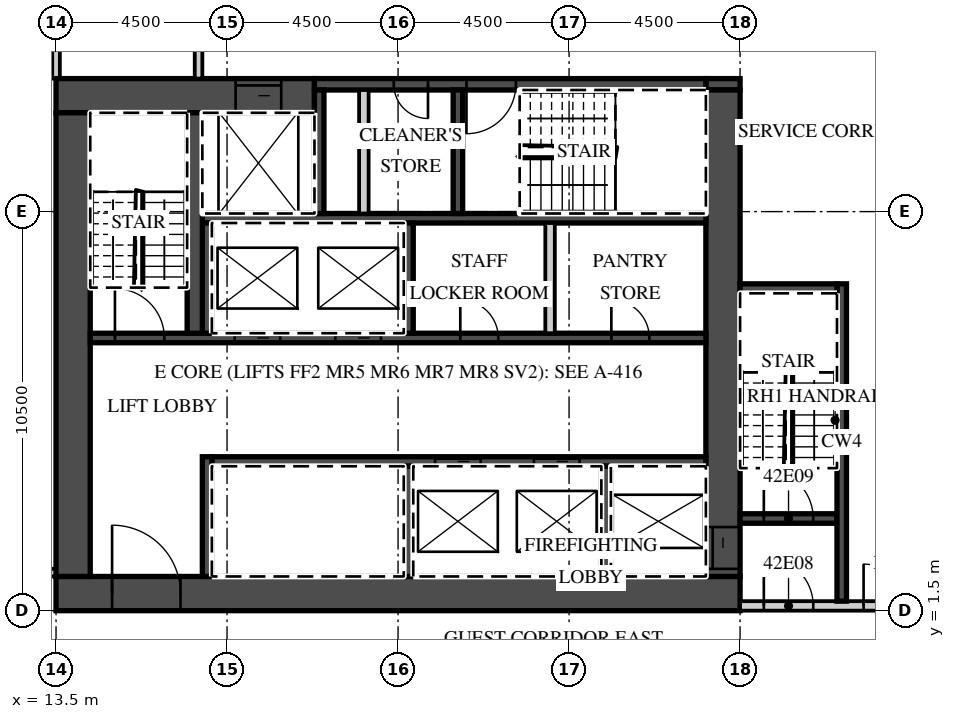
"""IFC4 building model, lengths in metres.
Left out: names, types, materials, properties, quantities, classifications, styles, units other than length and angle.
Written with IfcOpenShell. Run it as: python <this file> out.ifc"""

import sys

from ifc_helpers import new_model, si_unit, direction, frame, frame_2d, origin, place, context, subcontext, project, spatial, rectangle, extrude, element, fill, save


model = new_model("IFC4")
c1 = context("Model", 3, precision=1e-05, world=origin(), true_north=direction((0.0, 1.0)))
c2 = subcontext(c1, "Body", "Model", "MODEL_VIEW")
j1 = project(units=[si_unit("LENGTHUNIT", "METRE"), si_unit("PLANEANGLEUNIT", "RADIAN")], contexts=[c1])
p1 = place(None, origin())
s1 = spatial("IfcSite", under=j1, at=p1, CompositionType="ELEMENT")
p2 = place(p1, origin())
s2 = spatial("IfcBuilding", under=s1, at=p2, CompositionType="ELEMENT")
p3 = place(p2, frame((0.0, 0.0, 180.1)))
s3 = spatial("IfcBuildingStorey", under=s2, at=p3, CompositionType="ELEMENT", Elevation=180.1)
p4 = place(p3, frame((13.5, 15.5, 0.0), z_axis=(0.0, 0.0, 1.0), x_axis=(0.0, 1.0, 0.0)))
e1 = element("IfcWall", 1, at=p4, inside=s3, PredefinedType="PARTITIONING", context=c2, shape_type="SweptSolid", body=[
    extrude(rectangle(XDim=6.089, YDim=0.2, at=frame_2d((3.044, 0.0))), origin(), (0.0, 0.0, 1.0), 3.02),
])
p5 = place(p3, frame((-13.5, 2.5, 0.0), z_axis=(0.0, 0.0, 1.0), x_axis=(1.0, 0.0, 0.0)))
e2 = element("IfcWall", 2, at=p5, inside=s3, PredefinedType="PARTITIONING", context=c2, shape_type="SweptSolid", body=[
    extrude(rectangle(XDim=27.0, YDim=0.2, at=frame_2d((13.5, 0.0))), origin(), (0.0, 0.0, 1.0), 3.02),
])
p6 = place(p5, frame((0.575, 0.0, 0.0)))
e3 = element("IfcOpeningElement", 3, at=p6, cuts=e2, PredefinedType="OPENING", context=c2, shape_type="SweptSolid", body=[
    extrude(rectangle(XDim=1.0, YDim=2.1, at=frame_2d((0.5, 1.05))), frame((0.0, 0.11, 0.0), z_axis=(0.0, -1.0, 0.0), x_axis=(1.0, 0.0, 0.0)), (0.0, 0.0, 1.0), 0.22),
])
p7 = place(p5, frame((9.863, 0.0, 0.0)))
e4 = element("IfcOpeningElement", 4, at=p7, cuts=e2, PredefinedType="OPENING", context=c2, shape_type="SweptSolid", body=[
    extrude(rectangle(XDim=1.2, YDim=2.1, at=frame_2d((0.6, 1.05))), frame((0.0, 0.11, 0.0), z_axis=(0.0, -1.0, 0.0), x_axis=(1.0, 0.0, 0.0)), (0.0, 0.0, 1.0), 0.22),
])
p8 = place(p5, frame((15.938, 0.0, 0.0)))
e5 = element("IfcOpeningElement", 5, at=p8, cuts=e2, PredefinedType="OPENING", context=c2, shape_type="SweptSolid", body=[
    extrude(rectangle(XDim=1.2, YDim=2.1, at=frame_2d((0.6, 1.05))), frame((0.0, 0.11, 0.0), z_axis=(0.0, -1.0, 0.0), x_axis=(1.0, 0.0, 0.0)), (0.0, 0.0, 1.0), 0.22),
])
p9 = place(p5, frame((25.425, 0.0, 0.0)))
e6 = element("IfcOpeningElement", 6, at=p9, cuts=e2, PredefinedType="OPENING", context=c2, shape_type="SweptSolid", body=[
    extrude(rectangle(XDim=1.0, YDim=2.1, at=frame_2d((0.5, 1.05))), frame((0.0, 0.11, 0.0), z_axis=(0.0, -1.0, 0.0), x_axis=(1.0, 0.0, 0.0)), (0.0, 0.0, 1.0), 0.22),
])
p10 = place(p3, frame((13.5, 1.95, 0.0), z_axis=(0.0, 0.0, 1.0), x_axis=(1.0, 0.0, 0.0)))
e7 = element("IfcWall", 7, at=p10, inside=s3, PredefinedType="SHEAR", context=c2, shape_type="SweptSolid", body=[
    extrude(rectangle(XDim=18.0, YDim=0.9, at=frame_2d((9.0, 0.0))), origin(), (0.0, 0.0, 1.0), 3.02),
])
p11 = place(p10, frame((1.475, 0.0, 0.0)))
e8 = element("IfcOpeningElement", 8, at=p11, cuts=e7, PredefinedType="OPENING", context=c2, shape_type="SweptSolid", body=[
    extrude(rectangle(XDim=1.8, YDim=2.1, at=frame_2d((0.9, 1.05))), frame((0.0, 0.46, 0.0), z_axis=(0.0, -1.0, 0.0), x_axis=(1.0, 0.0, 0.0)), (0.0, 0.0, 1.0), 0.92),
])
p12 = place(p3, frame((13.5, 15.05, 0.0), z_axis=(0.0, 0.0, 1.0), x_axis=(1.0, 0.0, 0.0)))
e9 = element("IfcWall", 9, at=p12, inside=s3, PredefinedType="SHEAR", context=c2, shape_type="SweptSolid", body=[
    extrude(rectangle(XDim=6.8, YDim=0.9, at=frame_2d((3.4, 0.0))), origin(), (0.0, 0.0, 1.0), 3.02),
])
p13 = place(p12, frame((4.725, 0.0, 0.0)))
e10 = element("IfcOpeningElement", 10, at=p13, cuts=e9, PredefinedType="OPENING", context=c2, shape_type="SweptSolid", body=[
    extrude(rectangle(XDim=1.2, YDim=2.1, at=frame_2d((0.6, 1.05))), frame((0.0, 0.46, 0.0), z_axis=(0.0, -1.0, 0.0), x_axis=(1.0, 0.0, 0.0)), (0.0, 0.0, 1.0), 0.92),
])
p14 = place(p3, frame((30.6, 15.35, 0.0), z_axis=(0.0, 0.0, 1.0), x_axis=(1.0, 0.0, 0.0)))
e11 = element("IfcWall", 11, at=p14, inside=s3, PredefinedType="SHEAR", context=c2, shape_type="SweptSolid", body=[
    extrude(rectangle(XDim=0.9, YDim=0.3, at=frame_2d((0.45, 0.0))), origin(), (0.0, 0.0, 1.0), 3.02),
])
p15 = place(p3, frame((20.3, 15.35, 0.0), z_axis=(0.0, 0.0, 1.0), x_axis=(1.0, 0.0, 0.0)))
e12 = element("IfcWall", 12, at=p15, inside=s3, PredefinedType="SHEAR", context=c2, shape_type="SweptSolid", body=[
    extrude(rectangle(XDim=10.3, YDim=0.3, at=frame_2d((5.15, 0.0))), origin(), (0.0, 0.0, 1.0), 3.02),
])
p16 = place(p15, frame((4.0, 0.0, 0.0)))
e13 = element("IfcOpeningElement", 13, at=p16, cuts=e12, PredefinedType="OPENING", context=c2, shape_type="SweptSolid", body=[
    extrude(rectangle(XDim=1.3, YDim=2.1, at=frame_2d((0.65, 1.05))), frame((0.0, 0.16, 0.0), z_axis=(0.0, -1.0, 0.0), x_axis=(1.0, 0.0, 0.0)), (0.0, 0.0, 1.0), 0.32),
])
p17 = place(p15, frame((2.087, 0.0, 0.0)))
e14 = element("IfcOpeningElement", 14, at=p17, cuts=e12, PredefinedType="OPENING", context=c2, shape_type="SweptSolid", body=[
    extrude(rectangle(XDim=0.9, YDim=2.1, at=frame_2d((0.45, 1.05))), frame((0.0, 0.16, 0.0), z_axis=(0.0, -1.0, 0.0), x_axis=(1.0, 0.0, 0.0)), (0.0, 0.0, 1.0), 0.32),
])
p18 = place(p3, frame((31.05, 2.4, 0.0), z_axis=(0.0, 0.0, 1.0), x_axis=(0.0, 1.0, 0.0)))
e15 = element("IfcWall", 15, at=p18, inside=s3, PredefinedType="SHEAR", context=c2, shape_type="SweptSolid", body=[
    extrude(rectangle(XDim=12.8, YDim=0.9, at=frame_2d((6.4, 0.0))), origin(), (0.0, 0.0, 1.0), 3.02),
])
p19 = place(p18, frame((0.2, 0.0, 0.0)))
e16 = element("IfcOpeningElement", 16, at=p19, cuts=e15, PredefinedType="OPENING", context=c2, shape_type="SweptSolid", body=[
    extrude(rectangle(XDim=1.1, YDim=2.1, at=frame_2d((0.55, 1.05))), frame((0.0, 0.46, 0.0), z_axis=(0.0, -1.0, 0.0), x_axis=(1.0, 0.0, 0.0)), (0.0, 0.0, 1.0), 0.92),
])
p20 = place(p3, frame((13.95, 2.4, 0.0), z_axis=(0.0, 0.0, 1.0), x_axis=(0.0, 1.0, 0.0)))
e17 = element("IfcWall", 17, at=p20, inside=s3, PredefinedType="SHEAR", context=c2, shape_type="SweptSolid", body=[
    extrude(rectangle(XDim=12.2, YDim=0.9, at=frame_2d((6.1, 0.0))), origin(), (0.0, 0.0, 1.0), 3.02),
])
p21 = place(p3, frame((17.6, 5.425, 0.0), z_axis=(0.0, 0.0, 1.0), x_axis=(1.0, 0.0, 0.0)))
e18 = element("IfcWall", 18, at=p21, inside=s3, PredefinedType="SHEAR", context=c2, shape_type="SweptSolid", body=[
    extrude(rectangle(XDim=13.0, YDim=0.25, at=frame_2d((6.5, 0.0))), origin(), (0.0, 0.0, 1.0), 3.02),
])
p22 = place(p21, frame((8.475, 0.0, 0.0)))
e19 = element("IfcOpeningElement", 19, at=p22, cuts=e18, PredefinedType="OPENING", context=c2, shape_type="SweptSolid", body=[
    extrude(rectangle(XDim=1.2, YDim=2.1, at=frame_2d((0.6, 1.05))), frame((0.0, 0.135, 0.0), z_axis=(0.0, -1.0, 0.0), x_axis=(1.0, 0.0, 0.0)), (0.0, 0.0, 1.0), 0.27),
])
p23 = place(p21, frame((5.875, 0.0, 0.0)))
e20 = element("IfcOpeningElement", 20, at=p23, cuts=e18, PredefinedType="OPENING", context=c2, shape_type="SweptSolid", body=[
    extrude(rectangle(XDim=1.2, YDim=2.1, at=frame_2d((0.6, 1.05))), frame((0.0, 0.135, 0.0), z_axis=(0.0, -1.0, 0.0), x_axis=(1.0, 0.0, 0.0)), (0.0, 0.0, 1.0), 0.27),
])
p24 = place(p3, frame((17.475, 2.4, 0.0), z_axis=(0.0, 0.0, 1.0), x_axis=(0.0, 1.0, 0.0)))
e21 = element("IfcWall", 21, at=p24, inside=s3, PredefinedType="SHEAR", context=c2, shape_type="SweptSolid", body=[
    extrude(rectangle(XDim=3.15, YDim=0.25, at=frame_2d((1.575, 0.0))), origin(), (0.0, 0.0, 1.0), 3.02),
])
for number, where, z_axis, x_axis in (
    (22, (27.975, 2.4, 0.0), (0.0, 0.0, 1.0), (0.0, 1.0, 0.0)),
    (23, (22.775, 2.4, 0.0), (0.0, 0.0, 1.0), (0.0, 1.0, 0.0)),
):
    element("IfcWall", number, at=place(p3, frame(where, z_axis=z_axis, x_axis=x_axis)), inside=s3, PredefinedType="SHEAR", context=c2, shape_type="SweptSolid", body=[
        extrude(rectangle(XDim=2.9, YDim=0.25, at=frame_2d((1.45, 0.0))), origin(), (0.0, 0.0, 1.0), 3.02),
    ])
p25 = place(p3, frame((14.4, 8.675, 0.0), z_axis=(0.0, 0.0, 1.0), x_axis=(1.0, 0.0, 0.0)))
e24 = element("IfcWall", 24, at=p25, inside=s3, PredefinedType="SHEAR", context=c2, shape_type="SweptSolid", body=[
    extrude(rectangle(XDim=16.2, YDim=0.25, at=frame_2d((8.1, 0.0))), origin(), (0.0, 0.0, 1.0), 3.02),
])
p26 = place(p25, frame((6.45, 0.0, 0.0)))
e25 = element("IfcOpeningElement", 25, at=p26, cuts=e24, PredefinedType="OPENING", context=c2, shape_type="SweptSolid", body=[
    extrude(rectangle(XDim=1.2, YDim=2.1, at=frame_2d((0.6, 1.05))), frame((0.0, 0.135, 0.0), z_axis=(0.0, -1.0, 0.0), x_axis=(1.0, 0.0, 0.0)), (0.0, 0.0, 1.0), 0.27),
])
p27 = place(p25, frame((3.8, 0.0, 0.0)))
e26 = element("IfcOpeningElement", 26, at=p27, cuts=e24, PredefinedType="OPENING", context=c2, shape_type="SweptSolid", body=[
    extrude(rectangle(XDim=1.2, YDim=2.1, at=frame_2d((0.6, 1.05))), frame((0.0, 0.135, 0.0), z_axis=(0.0, -1.0, 0.0), x_axis=(1.0, 0.0, 0.0)), (0.0, 0.0, 1.0), 0.27),
])
p28 = place(p25, frame((0.65, 0.0, 0.0)))
e27 = element("IfcOpeningElement", 27, at=p28, cuts=e24, PredefinedType="OPENING", context=c2, shape_type="SweptSolid", body=[
    extrude(rectangle(XDim=1.3, YDim=2.1, at=frame_2d((0.65, 1.05))), frame((0.0, 0.135, 0.0), z_axis=(0.0, -1.0, 0.0), x_axis=(1.0, 0.0, 0.0)), (0.0, 0.0, 1.0), 0.27),
])
p29 = place(p25, frame((13.712, 0.0, 0.0)))
e28 = element("IfcOpeningElement", 28, at=p29, cuts=e24, PredefinedType="OPENING", context=c2, shape_type="SweptSolid", body=[
    extrude(rectangle(XDim=1.0, YDim=2.1, at=frame_2d((0.5, 1.05))), frame((0.0, 0.135, 0.0), z_axis=(0.0, -1.0, 0.0), x_axis=(1.0, 0.0, 0.0)), (0.0, 0.0, 1.0), 0.27),
])
p30 = place(p25, frame((9.738, 0.0, 0.0)))
e29 = element("IfcOpeningElement", 29, at=p30, cuts=e24, PredefinedType="OPENING", context=c2, shape_type="SweptSolid", body=[
    extrude(rectangle(XDim=1.0, YDim=2.1, at=frame_2d((0.5, 1.05))), frame((0.0, 0.135, 0.0), z_axis=(0.0, -1.0, 0.0), x_axis=(1.0, 0.0, 0.0)), (0.0, 0.0, 1.0), 0.27),
])
p31 = place(p3, frame((17.35, 11.825, 0.0), z_axis=(0.0, 0.0, 1.0), x_axis=(1.0, 0.0, 0.0)))
e30 = element("IfcWall", 30, at=p31, inside=s3, PredefinedType="SHEAR", context=c2, shape_type="SweptSolid", body=[
    extrude(rectangle(XDim=13.25, YDim=0.25, at=frame_2d((6.625, 0.0))), origin(), (0.0, 0.0, 1.0), 3.02),
])
for number, where, z_axis, x_axis in (
    (31, (17.475, 8.8, 0.0), (0.0, 0.0, 1.0), (0.0, 1.0, 0.0)),
    (32, (22.775, 8.8, 0.0), (0.0, 0.0, 1.0), (0.0, 1.0, 0.0)),
):
    element("IfcWall", number, at=place(p3, frame(where, z_axis=z_axis, x_axis=x_axis)), inside=s3, PredefinedType="SHEAR", context=c2, shape_type="SweptSolid", body=[
        extrude(rectangle(XDim=2.9, YDim=0.25, at=frame_2d((1.45, 0.0))), origin(), (0.0, 0.0, 1.0), 3.02),
    ])
p32 = place(p3, frame((26.5, 8.8, 0.0), z_axis=(0.0, 0.0, 1.0), x_axis=(0.0, 1.0, 0.0)))
e33 = element("IfcWall", 33, at=p32, inside=s3, PredefinedType="PARTITIONING", context=c2, shape_type="SweptSolid", body=[
    extrude(rectangle(XDim=2.9, YDim=0.25, at=frame_2d((1.45, 0.0))), origin(), (0.0, 0.0, 1.0), 3.02),
])
p33 = place(p3, frame((17.15, 8.8, 0.0), z_axis=(0.0, 0.0, 1.0), x_axis=(0.0, 1.0, 0.0)))
e34 = element("IfcWall", 34, at=p33, inside=s3, PredefinedType="SHEAR", context=c2, shape_type="SweptSolid", body=[
    extrude(rectangle(XDim=5.8, YDim=0.4, at=frame_2d((2.9, 0.0))), origin(), (0.0, 0.0, 1.0), 3.02),
])
for number, where, z_axis, x_axis in (
    (35, (20.425, 11.95, 0.0), (0.0, 0.0, 1.0), (0.0, 1.0, 0.0)),
    (36, (24.075, 11.95, 0.0), (0.0, 0.0, 1.0), (0.0, 1.0, 0.0)),
):
    element("IfcWall", number, at=place(p3, frame(where, z_axis=z_axis, x_axis=x_axis)), inside=s3, PredefinedType="SHEAR", context=c2, shape_type="SweptSolid", body=[
        extrude(rectangle(XDim=3.25, YDim=0.25, at=frame_2d((1.625, 0.0))), origin(), (0.0, 0.0, 1.0), 3.02),
    ])
p34 = place(p3, frame((21.6, 11.95, 0.0), z_axis=(0.0, 0.0, 1.0), x_axis=(0.0, 1.0, 0.0)))
e37 = element("IfcWall", 37, at=p34, inside=s3, PredefinedType="PARTITIONING", context=c2, shape_type="SweptSolid", body=[
    extrude(rectangle(XDim=3.25, YDim=0.25, at=frame_2d((1.625, 0.0))), origin(), (0.0, 0.0, 1.0), 3.02),
])
p35 = place(p3, frame((31.5, 1.625, 0.0), z_axis=(0.0, 0.0, 1.0), x_axis=(1.0, 0.0, 0.0)))
e38 = element("IfcWall", 38, at=p35, inside=s3, PredefinedType="PARTITIONING", context=c2, shape_type="SweptSolid", body=[
    extrude(rectangle(XDim=8.035, YDim=0.25, at=frame_2d((4.018, 0.0))), origin(), (0.0, 0.0, 1.0), 3.02),
])
p36 = place(p35, frame((0.625, 0.0, 0.0)))
e39 = element("IfcOpeningElement", 39, at=p36, cuts=e38, PredefinedType="OPENING", context=c2, shape_type="SweptSolid", body=[
    extrude(rectangle(XDim=1.3, YDim=2.1, at=frame_2d((0.65, 1.05))), frame((0.0, 0.135, 0.0), z_axis=(0.0, -1.0, 0.0), x_axis=(1.0, 0.0, 0.0)), (0.0, 0.0, 1.0), 0.27),
])
p37 = place(p35, frame((3.25, 0.0, 0.0)))
e40 = element("IfcOpeningElement", 40, at=p37, cuts=e38, PredefinedType="OPENING", context=c2, shape_type="SweptSolid", body=[
    extrude(rectangle(XDim=1.1, YDim=2.1, at=frame_2d((0.55, 1.05))), frame((0.0, 0.135, 0.0), z_axis=(0.0, -1.0, 0.0), x_axis=(1.0, 0.0, 0.0)), (0.0, 0.0, 1.0), 0.27),
])
p38 = place(p3, frame((31.5, 3.925, 0.0), z_axis=(0.0, 0.0, 1.0), x_axis=(1.0, 0.0, 0.0)))
e41 = element("IfcWall", 41, at=p38, inside=s3, PredefinedType="SHEAR", context=c2, shape_type="SweptSolid", body=[
    extrude(rectangle(XDim=2.55, YDim=0.25, at=frame_2d((1.275, 0.0))), origin(), (0.0, 0.0, 1.0), 3.02),
])
p39 = place(p38, frame((0.625, 0.0, 0.0)))
e42 = element("IfcOpeningElement", 42, at=p39, cuts=e41, PredefinedType="OPENING", context=c2, shape_type="SweptSolid", body=[
    extrude(rectangle(XDim=1.3, YDim=2.1, at=frame_2d((0.65, 1.05))), frame((0.0, 0.135, 0.0), z_axis=(0.0, -1.0, 0.0), x_axis=(1.0, 0.0, 0.0)), (0.0, 0.0, 1.0), 0.27),
])
p40 = place(p3, frame((34.175, 1.75, 0.0), z_axis=(0.0, 0.0, 1.0), x_axis=(0.0, 1.0, 0.0)))
e43 = element("IfcWall", 43, at=p40, inside=s3, PredefinedType="SHEAR", context=c2, shape_type="SweptSolid", body=[
    extrude(rectangle(XDim=8.35, YDim=0.25, at=frame_2d((4.175, 0.0))), origin(), (0.0, 0.0, 1.0), 3.02),
])
p41 = place(p3, frame((31.5, 9.975, 0.0), z_axis=(0.0, 0.0, 1.0), x_axis=(1.0, 0.0, 0.0)))
e44 = element("IfcWall", 44, at=p41, inside=s3, PredefinedType="SHEAR", context=c2, shape_type="SweptSolid", body=[
    extrude(rectangle(XDim=2.55, YDim=0.25, at=frame_2d((1.275, 0.0))), origin(), (0.0, 0.0, 1.0), 3.02),
])
p42 = place(p3, frame((17.25, 15.5, 0.0), z_axis=(0.0, 0.0, 1.0), x_axis=(0.0, 1.0, 0.0)))
e45 = element("IfcWall", 45, at=p42, inside=s3, PredefinedType="PARTITIONING", context=c2, shape_type="SweptSolid", body=[
    extrude(rectangle(XDim=2.2, YDim=0.2, at=frame_2d((1.1, 0.0))), origin(), (0.0, 0.0, 1.0), 3.02),
])
p43 = place(p26, origin())
e46 = element("IfcDoor", 46, at=p43, inside=s3, OperationType="SLIDING_TO_LEFT", PredefinedType="DOOR", context=c2, shape_type="SweptSolid", body=[
    extrude(rectangle(XDim=1.2, YDim=2.1, at=frame_2d((0.6, 1.05))), frame((0.0, 0.025, 0.0), z_axis=(0.0, -1.0, 0.0), x_axis=(1.0, 0.0, 0.0)), (0.0, 0.0, 1.0), 0.05),
])
fill(e25, e46)
p44 = place(p27, origin())
e47 = element("IfcDoor", 47, at=p44, inside=s3, OperationType="SLIDING_TO_RIGHT", PredefinedType="DOOR", context=c2, shape_type="SweptSolid", body=[
    extrude(rectangle(XDim=1.2, YDim=2.1, at=frame_2d((0.6, 1.05))), frame((0.0, 0.025, 0.0), z_axis=(0.0, -1.0, 0.0), x_axis=(1.0, 0.0, 0.0)), (0.0, 0.0, 1.0), 0.05),
])
fill(e26, e47)
p45 = place(p22, origin())
e48 = element("IfcDoor", 48, at=p45, inside=s3, OperationType="SLIDING_TO_LEFT", PredefinedType="DOOR", context=c2, shape_type="SweptSolid", body=[
    extrude(rectangle(XDim=1.2, YDim=2.1, at=frame_2d((0.6, 1.05))), frame((0.0, 0.025, 0.0), z_axis=(0.0, -1.0, 0.0), x_axis=(1.0, 0.0, 0.0)), (0.0, 0.0, 1.0), 0.05),
])
fill(e19, e48)
p46 = place(p23, origin())
e49 = element("IfcDoor", 49, at=p46, inside=s3, OperationType="SLIDING_TO_RIGHT", PredefinedType="DOOR", context=c2, shape_type="SweptSolid", body=[
    extrude(rectangle(XDim=1.2, YDim=2.1, at=frame_2d((0.6, 1.05))), frame((0.0, 0.025, 0.0), z_axis=(0.0, -1.0, 0.0), x_axis=(1.0, 0.0, 0.0)), (0.0, 0.0, 1.0), 0.05),
])
fill(e20, e49)
p47 = place(p13, origin())
e50 = element("IfcDoor", 50, at=p47, inside=s3, OperationType="SLIDING_TO_LEFT", PredefinedType="DOOR", context=c2, shape_type="SweptSolid", body=[
    extrude(rectangle(XDim=1.2, YDim=2.1, at=frame_2d((0.6, 1.05))), frame((0.0, 0.025, 0.0), z_axis=(0.0, -1.0, 0.0), x_axis=(1.0, 0.0, 0.0)), (0.0, 0.0, 1.0), 0.05),
])
fill(e10, e50)
p48 = place(p19, origin())
e51 = element("IfcDoor", 51, at=p48, inside=s3, OperationType="SLIDING_TO_LEFT", PredefinedType="DOOR", context=c2, shape_type="SweptSolid", body=[
    extrude(rectangle(XDim=1.1, YDim=2.1, at=frame_2d((0.55, 1.05))), frame((0.0, 0.025, 0.0), z_axis=(0.0, -1.0, 0.0), x_axis=(1.0, 0.0, 0.0)), (0.0, 0.0, 1.0), 0.05),
])
fill(e16, e51)
p49 = place(p11, origin())
e52 = element("IfcDoor", 52, at=p49, inside=s3, OperationType="DOUBLE_DOOR_DOUBLE_SWING", PredefinedType="DOOR", context=c2, shape_type="SweptSolid", body=[
    extrude(rectangle(XDim=1.8, YDim=2.1, at=frame_2d((0.9, 1.05))), frame((0.0, 0.025, 0.0), z_axis=(0.0, -1.0, 0.0), x_axis=(1.0, 0.0, 0.0)), (0.0, 0.0, 1.0), 0.05),
])
fill(e8, e52)
p50 = place(p36, origin())
e53 = element("IfcDoor", 53, at=p50, inside=s3, OperationType="SINGLE_SWING_LEFT", PredefinedType="DOOR", context=c2, shape_type="SweptSolid", body=[
    extrude(rectangle(XDim=1.3, YDim=2.1, at=frame_2d((0.65, 1.05))), frame((0.0, 0.025, 0.0), z_axis=(0.0, -1.0, 0.0), x_axis=(1.0, 0.0, 0.0)), (0.0, 0.0, 1.0), 0.05),
])
fill(e39, e53)
p51 = place(p39, origin())
e54 = element("IfcDoor", 54, at=p51, inside=s3, OperationType="SINGLE_SWING_LEFT", PredefinedType="DOOR", context=c2, shape_type="SweptSolid", body=[
    extrude(rectangle(XDim=1.3, YDim=2.1, at=frame_2d((0.65, 1.05))), frame((0.0, 0.025, 0.0), z_axis=(0.0, -1.0, 0.0), x_axis=(1.0, 0.0, 0.0)), (0.0, 0.0, 1.0), 0.05),
])
fill(e42, e54)
p52 = place(p37, origin())
e55 = element("IfcDoor", 55, at=p52, inside=s3, OperationType="SINGLE_SWING_LEFT", PredefinedType="DOOR", context=c2, shape_type="SweptSolid", body=[
    extrude(rectangle(XDim=1.1, YDim=2.1, at=frame_2d((0.55, 1.05))), frame((0.0, 0.025, 0.0), z_axis=(0.0, -1.0, 0.0), x_axis=(1.0, 0.0, 0.0)), (0.0, 0.0, 1.0), 0.05),
])
fill(e40, e55)
p53 = place(p28, origin())
e56 = element("IfcDoor", 56, at=p53, inside=s3, OperationType="SINGLE_SWING_LEFT", PredefinedType="DOOR", context=c2, shape_type="SweptSolid", body=[
    extrude(rectangle(XDim=1.3, YDim=2.1, at=frame_2d((0.65, 1.05))), frame((0.0, 0.025, 0.0), z_axis=(0.0, -1.0, 0.0), x_axis=(1.0, 0.0, 0.0)), (0.0, 0.0, 1.0), 0.05),
])
fill(e27, e56)
p54 = place(p16, origin())
e57 = element("IfcDoor", 57, at=p54, inside=s3, OperationType="SINGLE_SWING_LEFT", PredefinedType="DOOR", context=c2, shape_type="SweptSolid", body=[
    extrude(rectangle(XDim=1.3, YDim=2.1, at=frame_2d((0.65, 1.05))), frame((0.0, 0.025, 0.0), z_axis=(0.0, -1.0, 0.0), x_axis=(1.0, 0.0, 0.0)), (0.0, 0.0, 1.0), 0.05),
])
fill(e13, e57)
p55 = place(p17, origin())
e58 = element("IfcDoor", 58, at=p55, inside=s3, OperationType="SINGLE_SWING_RIGHT", PredefinedType="DOOR", context=c2, shape_type="SweptSolid", body=[
    extrude(rectangle(XDim=0.9, YDim=2.1, at=frame_2d((0.45, 1.05))), frame((0.0, 0.025, 0.0), z_axis=(0.0, -1.0, 0.0), x_axis=(1.0, 0.0, 0.0)), (0.0, 0.0, 1.0), 0.05),
])
fill(e14, e58)
p56 = place(p29, origin())
e59 = element("IfcDoor", 59, at=p56, inside=s3, OperationType="SINGLE_SWING_LEFT", PredefinedType="DOOR", context=c2, shape_type="SweptSolid", body=[
    extrude(rectangle(XDim=1.0, YDim=2.1, at=frame_2d((0.5, 1.05))), frame((0.0, 0.025, 0.0), z_axis=(0.0, -1.0, 0.0), x_axis=(1.0, 0.0, 0.0)), (0.0, 0.0, 1.0), 0.05),
])
fill(e28, e59)
p57 = place(p30, origin())
e60 = element("IfcDoor", 60, at=p57, inside=s3, OperationType="SINGLE_SWING_LEFT", PredefinedType="DOOR", context=c2, shape_type="SweptSolid", body=[
    extrude(rectangle(XDim=1.0, YDim=2.1, at=frame_2d((0.5, 1.05))), frame((0.0, 0.025, 0.0), z_axis=(0.0, -1.0, 0.0), x_axis=(1.0, 0.0, 0.0)), (0.0, 0.0, 1.0), 0.05),
])
fill(e29, e60)
save(model, sys.argv[1])
